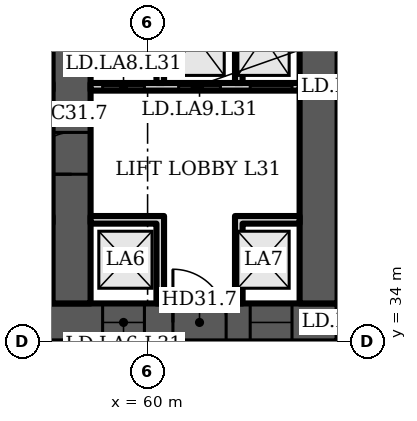
"""IFC4 building model, lengths in metres.
Left out: names, types, materials, properties, quantities, classifications, styles, units other than length and angle.
Written with IfcOpenShell. Run it as: python <this file> out.ifc"""

import sys

from ifc_helpers import new_model, si_unit, direction, frame, frame_2d, origin, place, context, subcontext, project, spatial, polyline, rectangle, outline, extrude, element, fill, save


model = new_model("IFC4")
c1 = context("Model", 3, precision=1e-05, world=origin(), true_north=direction((0.0, 1.0)))
c2 = subcontext(c1, "Body", "Model", "MODEL_VIEW")
j1 = project(units=[si_unit("LENGTHUNIT", "METRE"), si_unit("PLANEANGLEUNIT", "RADIAN")], contexts=[c1])
p1 = place(None, origin())
s1 = spatial("IfcSite", under=j1, at=p1, CompositionType="ELEMENT")
p2 = place(p1, origin())
s2 = spatial("IfcBuilding", under=s1, at=p2, CompositionType="ELEMENT")
p3 = place(p2, frame((0.0, 0.0, 132.7)))
s3 = spatial("IfcBuildingStorey", under=s2, at=p3, CompositionType="ELEMENT", Elevation=132.7)
p4 = place(p3, frame((16.0, 34.5, 0.0), z_axis=(0.0, 0.0, 1.0), x_axis=(1.0, 0.0, 0.0)))
e1 = element("IfcWall", 1, at=p4, inside=s3, PredefinedType="SHEAR", context=c2, shape_type="SweptSolid", body=[
    extrude(rectangle(XDim=49.0, YDim=1.0, at=frame_2d((24.5, 0.0))), origin(), (0.0, 0.0, 1.0), 3.6),
])
p5 = place(p4, frame((1.2, 0.0, 0.0)))
e2 = element("IfcOpeningElement", 2, at=p5, cuts=e1, PredefinedType="OPENING", context=c2, shape_type="SweptSolid", body=[
    extrude(rectangle(XDim=1.1, YDim=2.1, at=frame_2d((0.55, 1.05))), frame((0.0, 0.51, 0.0), z_axis=(0.0, -1.0, 0.0), x_axis=(1.0, 0.0, 0.0)), (0.0, 0.0, 1.0), 1.02),
])
p6 = place(p4, frame((5.083, 0.0, 0.0)))
e3 = element("IfcOpeningElement", 3, at=p6, cuts=e1, PredefinedType="OPENING", context=c2, shape_type="SweptSolid", body=[
    extrude(rectangle(XDim=1.1, YDim=2.1, at=frame_2d((0.55, 1.05))), frame((0.0, 0.51, 0.0), z_axis=(0.0, -1.0, 0.0), x_axis=(1.0, 0.0, 0.0)), (0.0, 0.0, 1.0), 1.02),
])
p7 = place(p4, frame((2.933, 0.0, 0.0)))
e4 = element("IfcOpeningElement", 4, at=p7, cuts=e1, PredefinedType="OPENING", context=c2, shape_type="SweptSolid", body=[
    extrude(rectangle(XDim=1.4, YDim=2.1, at=frame_2d((0.7, 1.05))), frame((0.0, 0.51, 0.0), z_axis=(0.0, -1.0, 0.0), x_axis=(1.0, 0.0, 0.0)), (0.0, 0.0, 1.0), 1.02),
])
p8 = place(p4, frame((7.65, 0.0, 0.0)))
e5 = element("IfcOpeningElement", 5, at=p8, cuts=e1, PredefinedType="OPENING", context=c2, shape_type="SweptSolid", body=[
    extrude(rectangle(XDim=1.2, YDim=2.1, at=frame_2d((0.6, 1.05))), frame((0.0, 0.51, 0.0), z_axis=(0.0, -1.0, 0.0), x_axis=(1.0, 0.0, 0.0)), (0.0, 0.0, 1.0), 1.02),
])
p9 = place(p4, frame((14.817, 0.0, 0.0)))
e6 = element("IfcOpeningElement", 6, at=p9, cuts=e1, PredefinedType="OPENING", context=c2, shape_type="SweptSolid", body=[
    extrude(rectangle(XDim=1.1, YDim=2.1, at=frame_2d((0.55, 1.05))), frame((0.0, 0.51, 0.0), z_axis=(0.0, -1.0, 0.0), x_axis=(1.0, 0.0, 0.0)), (0.0, 0.0, 1.0), 1.02),
])
p10 = place(p4, frame((19.083, 0.0, 0.0)))
e7 = element("IfcOpeningElement", 7, at=p10, cuts=e1, PredefinedType="OPENING", context=c2, shape_type="SweptSolid", body=[
    extrude(rectangle(XDim=1.1, YDim=2.1, at=frame_2d((0.55, 1.05))), frame((0.0, 0.51, 0.0), z_axis=(0.0, -1.0, 0.0), x_axis=(1.0, 0.0, 0.0)), (0.0, 0.0, 1.0), 1.02),
])
p11 = place(p4, frame((16.8, 0.0, 0.0)))
e8 = element("IfcOpeningElement", 8, at=p11, cuts=e1, PredefinedType="OPENING", context=c2, shape_type="SweptSolid", body=[
    extrude(rectangle(XDim=1.4, YDim=2.1, at=frame_2d((0.7, 1.05))), frame((0.0, 0.51, 0.0), z_axis=(0.0, -1.0, 0.0), x_axis=(1.0, 0.0, 0.0)), (0.0, 0.0, 1.0), 1.02),
])
p12 = place(p4, frame((21.817, 0.0, 0.0)))
e9 = element("IfcOpeningElement", 9, at=p12, cuts=e1, PredefinedType="OPENING", context=c2, shape_type="SweptSolid", body=[
    extrude(rectangle(XDim=1.1, YDim=2.1, at=frame_2d((0.55, 1.05))), frame((0.0, 0.51, 0.0), z_axis=(0.0, -1.0, 0.0), x_axis=(1.0, 0.0, 0.0)), (0.0, 0.0, 1.0), 1.02),
])
p13 = place(p4, frame((26.083, 0.0, 0.0)))
e10 = element("IfcOpeningElement", 10, at=p13, cuts=e1, PredefinedType="OPENING", context=c2, shape_type="SweptSolid", body=[
    extrude(rectangle(XDim=1.1, YDim=2.1, at=frame_2d((0.55, 1.05))), frame((0.0, 0.51, 0.0), z_axis=(0.0, -1.0, 0.0), x_axis=(1.0, 0.0, 0.0)), (0.0, 0.0, 1.0), 1.02),
])
p14 = place(p4, frame((33.15, 0.0, 0.0)))
e11 = element("IfcOpeningElement", 11, at=p14, cuts=e1, PredefinedType="OPENING", context=c2, shape_type="SweptSolid", body=[
    extrude(rectangle(XDim=1.2, YDim=2.1, at=frame_2d((0.6, 1.05))), frame((0.0, 0.51, 0.0), z_axis=(0.0, -1.0, 0.0), x_axis=(1.0, 0.0, 0.0)), (0.0, 0.0, 1.0), 1.02),
])
p15 = place(p4, frame((37.8, 0.0, 0.0)))
e12 = element("IfcOpeningElement", 12, at=p15, cuts=e1, PredefinedType="OPENING", context=c2, shape_type="SweptSolid", body=[
    extrude(rectangle(XDim=1.4, YDim=2.1, at=frame_2d((0.7, 1.05))), frame((0.0, 0.51, 0.0), z_axis=(0.0, -1.0, 0.0), x_axis=(1.0, 0.0, 0.0)), (0.0, 0.0, 1.0), 1.02),
])
p16 = place(p4, frame((42.817, 0.0, 0.0)))
e13 = element("IfcOpeningElement", 13, at=p16, cuts=e1, PredefinedType="OPENING", context=c2, shape_type="SweptSolid", body=[
    extrude(rectangle(XDim=1.1, YDim=2.1, at=frame_2d((0.55, 1.05))), frame((0.0, 0.51, 0.0), z_axis=(0.0, -1.0, 0.0), x_axis=(1.0, 0.0, 0.0)), (0.0, 0.0, 1.0), 1.02),
])
p17 = place(p4, frame((46.7, 0.0, 0.0)))
e14 = element("IfcOpeningElement", 14, at=p17, cuts=e1, PredefinedType="OPENING", context=c2, shape_type="SweptSolid", body=[
    extrude(rectangle(XDim=1.1, YDim=2.1, at=frame_2d((0.55, 1.05))), frame((0.0, 0.51, 0.0), z_axis=(0.0, -1.0, 0.0), x_axis=(1.0, 0.0, 0.0)), (0.0, 0.0, 1.0), 1.02),
])
p18 = place(p4, frame((44.667, 0.0, 0.0)))
e15 = element("IfcOpeningElement", 15, at=p18, cuts=e1, PredefinedType="OPENING", context=c2, shape_type="SweptSolid", body=[
    extrude(rectangle(XDim=1.4, YDim=2.1, at=frame_2d((0.7, 1.05))), frame((0.0, 0.51, 0.0), z_axis=(0.0, -1.0, 0.0), x_axis=(1.0, 0.0, 0.0)), (0.0, 0.0, 1.0), 1.02),
])
p19 = place(p3, frame((58.0, 35.0, 0.0), z_axis=(0.0, 0.0, 1.0), x_axis=(0.0, 1.0, 0.0)))
e16 = element("IfcWall", 16, at=p19, inside=s3, PredefinedType="SHEAR", context=c2, shape_type="SweptSolid", body=[
    extrude(rectangle(XDim=13.352, YDim=1.0, at=frame_2d((6.676, 0.0))), origin(), (0.0, 0.0, 1.0), 3.6),
])
p20 = place(p19, frame((10.426, 0.0, 0.0)))
e17 = element("IfcOpeningElement", 17, at=p20, cuts=e16, PredefinedType="OPENING", context=c2, shape_type="SweptSolid", body=[
    extrude(rectangle(XDim=1.0, YDim=2.1, at=frame_2d((0.5, 1.05))), frame((0.0, 0.51, 0.0), z_axis=(0.0, -1.0, 0.0), x_axis=(1.0, 0.0, 0.0)), (0.0, 0.0, 1.0), 1.02),
])
p21 = place(p19, frame((3.4, 0.0, 0.0)))
e18 = element("IfcOpeningElement", 18, at=p21, cuts=e16, PredefinedType="OPENING", context=c2, shape_type="SweptSolid", body=[
    extrude(rectangle(XDim=1.1, YDim=2.1, at=frame_2d((0.55, 1.05))), frame((0.0, 0.51, 0.0), z_axis=(0.0, -1.0, 0.0), x_axis=(1.0, 0.0, 0.0)), (0.0, 0.0, 1.0), 1.02),
])
p22 = place(p3, frame((64.5, 35.0, 0.0), z_axis=(0.0, 0.0, 1.0), x_axis=(0.0, 1.0, 0.0)))
e19 = element("IfcWall", 19, at=p22, inside=s3, PredefinedType="SHEAR", context=c2, shape_type="SweptSolid", body=[
    extrude(rectangle(XDim=12.784, YDim=1.0, at=frame_2d((6.392, 0.0))), origin(), (0.0, 0.0, 1.0), 3.6),
])
p23 = place(p3, frame((58.5, 40.7, 0.0), z_axis=(0.0, 0.0, 1.0), x_axis=(1.0, 0.0, 0.0)))
e20 = element("IfcWall", 20, at=p23, inside=s3, PredefinedType="PARTITIONING", context=c2, shape_type="SweptSolid", body=[
    extrude(rectangle(XDim=5.5, YDim=0.2, at=frame_2d((2.75, 0.0))), origin(), (0.0, 0.0, 1.0), 3.2),
])
p24 = place(p23, frame((0.317, 0.0, 0.0)))
e21 = element("IfcOpeningElement", 21, at=p24, cuts=e20, PredefinedType="OPENING", context=c2, shape_type="SweptSolid", body=[
    extrude(rectangle(XDim=1.1, YDim=2.1, at=frame_2d((0.55, 1.05))), frame((0.0, 0.11, 0.0), z_axis=(0.0, -1.0, 0.0), x_axis=(1.0, 0.0, 0.0)), (0.0, 0.0, 1.0), 0.22),
])
p25 = place(p23, frame((2.317, 0.0, 0.0)))
e22 = element("IfcOpeningElement", 22, at=p25, cuts=e20, PredefinedType="OPENING", context=c2, shape_type="SweptSolid", body=[
    extrude(rectangle(XDim=1.1, YDim=2.1, at=frame_2d((0.55, 1.05))), frame((0.0, 0.11, 0.0), z_axis=(0.0, -1.0, 0.0), x_axis=(1.0, 0.0, 0.0)), (0.0, 0.0, 1.0), 0.22),
])
p26 = place(p23, frame((4.2, 0.0, 0.0)))
e23 = element("IfcOpeningElement", 23, at=p26, cuts=e20, PredefinedType="OPENING", context=c2, shape_type="SweptSolid", body=[
    extrude(rectangle(XDim=1.1, YDim=2.1, at=frame_2d((0.55, 1.05))), frame((0.0, 0.11, 0.0), z_axis=(0.0, -1.0, 0.0), x_axis=(1.0, 0.0, 0.0)), (0.0, 0.0, 1.0), 0.22),
])
p27 = place(p3, frame((0.0, 0.0, -0.0)))
e24 = element("IfcWall", 24, at=p27, inside=s3, PredefinedType="PARTITIONING", context=c2, shape_type="SweptSolid", body=[
    extrude(outline(polyline([(60.233, 37.1), (58.5, 37.1), (58.5, 37.3), (60.233, 37.3), (60.433, 37.3), (60.433, 35.0), (60.233, 35.0), (60.233, 37.1)])), origin(), (0.0, 0.0, 1.0), 3.2),
])
p28 = place(p3, frame((0.0, 0.0, -0.0)))
e25 = element("IfcWall", 25, at=p28, inside=s3, PredefinedType="PARTITIONING", context=c2, shape_type="SweptSolid", body=[
    extrude(outline(polyline([(62.3, 37.3), (62.5, 37.3), (64.0, 37.3), (64.0, 37.1), (62.5, 37.1), (62.5, 35.0), (62.3, 35.0), (62.3, 37.3)])), origin(), (0.0, 0.0, 1.0), 3.2),
])
p29 = place(p3, frame((0.0, 0.0, -0.0)))
e26 = element("IfcWall", 26, at=p29, inside=s3, PredefinedType="PARTITIONING", context=c2, shape_type="SweptSolid", body=[
    extrude(outline(polyline([(60.433, 40.8), (60.233, 40.8), (60.233, 43.8), (58.5, 43.8), (58.5, 44.0), (64.0, 44.0), (64.0, 43.8), (62.5, 43.8), (62.5, 40.8), (62.3, 40.8), (62.3, 43.8), (60.433, 43.8), (60.433, 40.8)])), origin(), (0.0, 0.0, 1.0), 3.2),
])
p30 = place(p16, origin())
e27 = element("IfcDoor", 27, at=p30, inside=s3, OperationType="DOUBLE_DOOR_SLIDING", PredefinedType="DOOR", context=c2, shape_type="SweptSolid", body=[
    extrude(rectangle(XDim=1.1, YDim=2.1, at=frame_2d((0.55, 1.05))), frame((0.0, 0.025, 0.0), z_axis=(0.0, -1.0, 0.0), x_axis=(1.0, 0.0, 0.0)), (0.0, 0.0, 1.0), 0.05),
])
fill(e13, e27)
p31 = place(p17, origin())
e28 = element("IfcDoor", 28, at=p31, inside=s3, OperationType="DOUBLE_DOOR_SLIDING", PredefinedType="DOOR", context=c2, shape_type="SweptSolid", body=[
    extrude(rectangle(XDim=1.1, YDim=2.1, at=frame_2d((0.55, 1.05))), frame((0.0, 0.025, 0.0), z_axis=(0.0, -1.0, 0.0), x_axis=(1.0, 0.0, 0.0)), (0.0, 0.0, 1.0), 0.05),
])
fill(e14, e28)
p32 = place(p18, origin())
e29 = element("IfcDoor", 29, at=p32, inside=s3, OperationType="DOUBLE_DOOR_SINGLE_SWING", PredefinedType="DOOR", context=c2, shape_type="SweptSolid", body=[
    extrude(rectangle(XDim=1.4, YDim=2.1, at=frame_2d((0.7, 1.05))), frame((0.0, 0.025, 0.0), z_axis=(0.0, -1.0, 0.0), x_axis=(1.0, 0.0, 0.0)), (0.0, 0.0, 1.0), 0.05),
])
fill(e15, e29)
p33 = place(p24, origin())
e30 = element("IfcDoor", 30, at=p33, inside=s3, OperationType="DOUBLE_DOOR_SLIDING", PredefinedType="DOOR", context=c2, shape_type="SweptSolid", body=[
    extrude(rectangle(XDim=1.1, YDim=2.1, at=frame_2d((0.55, 1.05))), frame((0.0, 0.025, 0.0), z_axis=(0.0, -1.0, 0.0), x_axis=(1.0, 0.0, 0.0)), (0.0, 0.0, 1.0), 0.05),
])
fill(e21, e30)
p34 = place(p25, origin())
e31 = element("IfcDoor", 31, at=p34, inside=s3, OperationType="DOUBLE_DOOR_SLIDING", PredefinedType="DOOR", context=c2, shape_type="SweptSolid", body=[
    extrude(rectangle(XDim=1.1, YDim=2.1, at=frame_2d((0.55, 1.05))), frame((0.0, 0.025, 0.0), z_axis=(0.0, -1.0, 0.0), x_axis=(1.0, 0.0, 0.0)), (0.0, 0.0, 1.0), 0.05),
])
fill(e22, e31)
p35 = place(p26, origin())
e32 = element("IfcDoor", 32, at=p35, inside=s3, OperationType="DOUBLE_DOOR_SLIDING", PredefinedType="DOOR", context=c2, shape_type="SweptSolid", body=[
    extrude(rectangle(XDim=1.1, YDim=2.1, at=frame_2d((0.55, 1.05))), frame((0.0, 0.025, 0.0), z_axis=(0.0, -1.0, 0.0), x_axis=(1.0, 0.0, 0.0)), (0.0, 0.0, 1.0), 0.05),
])
fill(e23, e32)
p36 = place(p21, origin())
e33 = element("IfcDoor", 33, at=p36, inside=s3, OperationType="SINGLE_SWING_LEFT", PredefinedType="DOOR", context=c2, shape_type="SweptSolid", body=[
    extrude(rectangle(XDim=1.1, YDim=2.1, at=frame_2d((0.55, 1.05))), frame((0.0, 0.025, 0.0), z_axis=(0.0, -1.0, 0.0), x_axis=(1.0, 0.0, 0.0)), (0.0, 0.0, 1.0), 0.05),
])
fill(e18, e33)
save(model, sys.argv[1])
